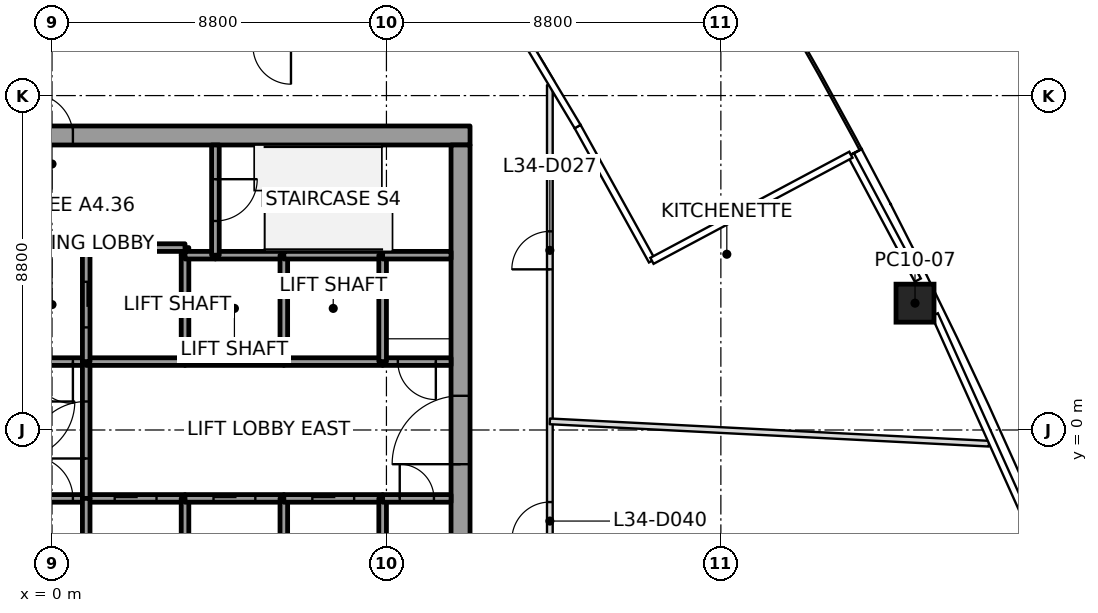
"""IFC4 building model, lengths in metres.
Left out: names, types, materials, properties, quantities, classifications, styles, units other than length and angle.
Written with IfcOpenShell. Run it as: python <this file> out.ifc"""

import sys

from ifc_helpers import new_model, si_unit, direction, frame, frame_2d, origin, origin_2d, place, context, subcontext, project, spatial, rectangle, extrude, element, fill, save


model = new_model("IFC4")
c1 = context("Model", 3, precision=1e-05, world=origin(), true_north=direction((0.0, 1.0)))
c2 = subcontext(c1, "Body", "Model", "MODEL_VIEW")
j1 = project(units=[si_unit("LENGTHUNIT", "METRE"), si_unit("PLANEANGLEUNIT", "RADIAN")], contexts=[c1])
p1 = place(None, origin())
s1 = spatial("IfcSite", under=j1, at=p1, CompositionType="ELEMENT")
p2 = place(p1, origin())
s2 = spatial("IfcBuilding", under=s1, at=p2, CompositionType="ELEMENT")
p3 = place(p2, frame((0.0, 0.0, 157.8)))
s3 = spatial("IfcBuildingStorey", under=s2, at=p3, CompositionType="ELEMENT", Elevation=157.8)
p4 = place(p3, frame((22.709, 3.338, 0.0), z_axis=(-0.014097689605, 0.002074984617, 0.999898469639), x_axis=(-0.440598986635, 0.897667716395, -0.008074894304)))
e1 = element("IfcColumn", 1, at=p4, inside=s3, PredefinedType="COLUMN", context=c2, shape_type="SweptSolid", body=[
    extrude(rectangle(XDim=1.0, YDim=1.0, at=origin_2d()), origin(), (0.0, 0.0, 1.0), 4.0),
])
p5 = place(p3, frame((-11.0, 7.75, 0.0), z_axis=(0.0, 0.0, 1.0), x_axis=(1.0, 0.0, 0.0)))
e2 = element("IfcWall", 2, at=p5, inside=s3, PredefinedType="SHEAR", context=c2, shape_type="SweptSolid", body=[
    extrude(rectangle(XDim=22.0, YDim=0.5, at=frame_2d((11.0, 0.0))), origin(), (0.0, 0.0, 1.0), 4.0),
])
p6 = place(p5, frame((10.45, 0.0, 0.0)))
e3 = element("IfcOpeningElement", 3, at=p6, cuts=e2, PredefinedType="OPENING", context=c2, shape_type="SweptSolid", body=[
    extrude(rectangle(XDim=1.1, YDim=2.1, at=frame_2d((0.55, 1.05))), frame((0.0, 0.25, 0.0), z_axis=(0.0, -1.0, 0.0), x_axis=(1.0, 0.0, 0.0)), (0.0, 0.0, 1.0), 0.5),
])
p7 = place(p3, frame((10.75, -7.5, 0.0), z_axis=(0.0, 0.0, 1.0), x_axis=(0.0, 1.0, 0.0)))
e4 = element("IfcWall", 4, at=p7, inside=s3, PredefinedType="SHEAR", context=c2, shape_type="SweptSolid", body=[
    extrude(rectangle(XDim=15.0, YDim=0.5, at=frame_2d((7.5, 0.0))), origin(), (0.0, 0.0, 1.0), 4.0),
])
p8 = place(p7, frame((6.6, 0.0, 0.0)))
e5 = element("IfcOpeningElement", 5, at=p8, cuts=e4, PredefinedType="OPENING", context=c2, shape_type="SweptSolid", body=[
    extrude(rectangle(XDim=1.8, YDim=2.1, at=frame_2d((0.9, 1.05))), frame((0.0, 0.25, 0.0), z_axis=(0.0, -1.0, 0.0), x_axis=(1.0, 0.0, 0.0)), (0.0, 0.0, 1.0), 0.5),
])
p9 = place(p3, frame((-0.9, -1.8, 0.0), z_axis=(0.0, 0.0, 1.0), x_axis=(1.0, 0.0, 0.0)))
e6 = element("IfcWall", 6, at=p9, inside=s3, PredefinedType="SOLIDWALL", context=c2, shape_type="SweptSolid", body=[
    extrude(rectangle(XDim=1.8, YDim=0.2, at=frame_2d((0.9, 0.0))), origin(), (0.0, 0.0, 1.0), 3.85),
])
p10 = place(p9, frame((0.35, 0.0, 0.0)))
e7 = element("IfcOpeningElement", 7, at=p10, cuts=e6, PredefinedType="OPENING", context=c2, shape_type="SweptSolid", body=[
    extrude(rectangle(XDim=1.1, YDim=2.1, at=frame_2d((0.55, 1.05))), frame((0.0, 0.1, 0.0), z_axis=(0.0, -1.0, 0.0), x_axis=(1.0, 0.0, 0.0)), (0.0, 0.0, 1.0), 0.2),
])
p11 = place(p3, frame((0.9, 1.8, 0.0), z_axis=(0.0, 0.0, 1.0), x_axis=(-1.0, 0.0, 0.0)))
e8 = element("IfcWall", 8, at=p11, inside=s3, PredefinedType="SOLIDWALL", context=c2, shape_type="SweptSolid", body=[
    extrude(rectangle(XDim=1.8, YDim=0.2, at=frame_2d((0.9, 0.0))), origin(), (0.0, 0.0, 1.0), 3.85),
])
p12 = place(p11, frame((0.35, 0.0, 0.0)))
e9 = element("IfcOpeningElement", 9, at=p12, cuts=e8, PredefinedType="OPENING", context=c2, shape_type="SweptSolid", body=[
    extrude(rectangle(XDim=1.1, YDim=2.1, at=frame_2d((0.55, 1.05))), frame((0.0, 0.1, 0.0), z_axis=(0.0, -1.0, 0.0), x_axis=(1.0, 0.0, 0.0)), (0.0, 0.0, 1.0), 0.2),
])
p13 = place(p3, frame((0.9, -1.8, 0.0), z_axis=(0.0, 0.0, 1.0), x_axis=(1.0, 0.0, 0.0)))
e10 = element("IfcWall", 10, at=p13, inside=s3, PredefinedType="SOLIDWALL", context=c2, shape_type="SweptSolid", body=[
    extrude(rectangle(XDim=2.6, YDim=0.2, at=frame_2d((1.3, 0.0))), origin(), (0.0, 0.0, 1.0), 3.85),
])
p14 = place(p13, frame((0.75, 0.0, 0.0)))
e11 = element("IfcOpeningElement", 11, at=p14, cuts=e10, PredefinedType="OPENING", context=c2, shape_type="SweptSolid", body=[
    extrude(rectangle(XDim=1.1, YDim=2.1, at=frame_2d((0.55, 1.05))), frame((0.0, 0.1, 0.0), z_axis=(0.0, -1.0, 0.0), x_axis=(1.0, 0.0, 0.0)), (0.0, 0.0, 1.0), 0.2),
])
p15 = place(p3, frame((0.9, -1.8, 0.0), z_axis=(0.0, 0.0, 1.0), x_axis=(0.0, 1.0, 0.0)))
e12 = element("IfcWall", 12, at=p15, inside=s3, PredefinedType="SOLIDWALL", context=c2, shape_type="SweptSolid", body=[
    extrude(rectangle(XDim=3.6, YDim=0.2, at=frame_2d((1.8, 0.0))), origin(), (0.0, 0.0, 1.0), 3.85),
])
p16 = place(p15, frame((1.05, 0.0, 0.0)))
e13 = element("IfcOpeningElement", 13, at=p16, cuts=e12, PredefinedType="OPENING", context=c2, shape_type="SweptSolid", body=[
    extrude(rectangle(XDim=1.5, YDim=2.1, at=frame_2d((0.75, 1.05))), frame((0.0, 0.1, 0.0), z_axis=(0.0, -1.0, 0.0), x_axis=(1.0, 0.0, 0.0)), (0.0, 0.0, 1.0), 0.2),
])
p17 = place(p3, frame((0.9, -1.8, 0.0), z_axis=(0.0, 0.0, 1.0), x_axis=(0.0, -1.0, 0.0)))
e14 = element("IfcWall", 14, at=p17, inside=s3, PredefinedType="SOLIDWALL", context=c2, shape_type="SweptSolid", body=[
    extrude(rectangle(XDim=2.8, YDim=0.2, at=frame_2d((1.4, 0.0))), origin(), (0.0, 0.0, 1.0), 3.85),
])
p18 = place(p3, frame((3.5, 1.8, 0.0), z_axis=(0.0, 0.0, 1.0), x_axis=(-1.0, 0.0, 0.0)))
e15 = element("IfcWall", 15, at=p18, inside=s3, PredefinedType="SOLIDWALL", context=c2, shape_type="SweptSolid", body=[
    extrude(rectangle(XDim=2.6, YDim=0.2, at=frame_2d((1.3, 0.0))), origin(), (0.0, 0.0, 1.0), 3.85),
])
p19 = place(p3, frame((3.5, 4.6, 0.0), z_axis=(0.0, 0.0, 1.0), x_axis=(0.0, 1.0, 0.0)))
e16 = element("IfcWall", 16, at=p19, inside=s3, PredefinedType="SOLIDWALL", context=c2, shape_type="SweptSolid", body=[
    extrude(rectangle(XDim=0.2, YDim=0.2, at=frame_2d((0.1, 0.0))), origin(), (0.0, 0.0, 1.0), 3.85),
])
p20 = place(p3, frame((3.5, 4.8, 0.0), z_axis=(0.0, 0.0, 1.0), x_axis=(-1.0, 0.0, 0.0)))
e17 = element("IfcWall", 17, at=p20, inside=s3, PredefinedType="SOLIDWALL", context=c2, shape_type="SweptSolid", body=[
    extrude(rectangle(XDim=2.6, YDim=0.2, at=frame_2d((1.3, 0.0))), origin(), (0.0, 0.0, 1.0), 3.85),
])
p21 = place(p3, frame((0.9, 4.8, 0.0), z_axis=(0.0, 0.0, 1.0), x_axis=(0.0, -1.0, 0.0)))
e18 = element("IfcWall", 18, at=p21, inside=s3, PredefinedType="SOLIDWALL", context=c2, shape_type="SweptSolid", body=[
    extrude(rectangle(XDim=3.0, YDim=0.2, at=frame_2d((1.5, 0.0))), origin(), (0.0, 0.0, 1.0), 3.85),
])
p22 = place(p21, frame((0.9, 0.0, 0.0)))
e19 = element("IfcOpeningElement", 19, at=p22, cuts=e18, PredefinedType="OPENING", context=c2, shape_type="SweptSolid", body=[
    extrude(rectangle(XDim=1.2, YDim=2.1, at=frame_2d((0.6, 1.05))), frame((0.0, 0.1, 0.0), z_axis=(0.0, -1.0, 0.0), x_axis=(1.0, 0.0, 0.0)), (0.0, 0.0, 1.0), 0.2),
])
p23 = place(p3, frame((3.5, -4.6, 0.0), z_axis=(0.0, 0.0, 1.0), x_axis=(0.0, 1.0, 0.0)))
e20 = element("IfcWall", 20, at=p23, inside=s3, PredefinedType="SOLIDWALL", context=c2, shape_type="SweptSolid", body=[
    extrude(rectangle(XDim=2.8, YDim=0.2, at=frame_2d((1.4, 0.0))), origin(), (0.0, 0.0, 1.0), 3.85),
])
p24 = place(p3, frame((3.5, -1.8, 0.0), z_axis=(0.0, 0.0, 1.0), x_axis=(1.0, 0.0, 0.0)))
e21 = element("IfcWall", 21, at=p24, inside=s3, PredefinedType="SOLIDWALL", context=c2, shape_type="SweptSolid", body=[
    extrude(rectangle(XDim=2.6, YDim=0.2, at=frame_2d((1.3, 0.0))), origin(), (0.0, 0.0, 1.0), 3.85),
])
p25 = place(p24, frame((0.75, 0.0, 0.0)))
e22 = element("IfcOpeningElement", 22, at=p25, cuts=e21, PredefinedType="OPENING", context=c2, shape_type="SweptSolid", body=[
    extrude(rectangle(XDim=1.1, YDim=2.1, at=frame_2d((0.55, 1.05))), frame((0.0, 0.1, 0.0), z_axis=(0.0, -1.0, 0.0), x_axis=(1.0, 0.0, 0.0)), (0.0, 0.0, 1.0), 0.2),
])
p26 = place(p3, frame((6.1, 1.8, 0.0), z_axis=(0.0, 0.0, 1.0), x_axis=(-1.0, 0.0, 0.0)))
e23 = element("IfcWall", 23, at=p26, inside=s3, PredefinedType="SOLIDWALL", context=c2, shape_type="SweptSolid", body=[
    extrude(rectangle(XDim=2.6, YDim=0.2, at=frame_2d((1.3, 0.0))), origin(), (0.0, 0.0, 1.0), 3.85),
])
p27 = place(p3, frame((3.5, 1.8, 0.0), z_axis=(0.0, 0.0, 1.0), x_axis=(0.0, 1.0, 0.0)))
e24 = element("IfcWall", 24, at=p27, inside=s3, PredefinedType="SOLIDWALL", context=c2, shape_type="SweptSolid", body=[
    extrude(rectangle(XDim=2.8, YDim=0.2, at=frame_2d((1.4, 0.0))), origin(), (0.0, 0.0, 1.0), 3.85),
])
p28 = place(p3, frame((4.3, 4.6, 0.0), z_axis=(0.0, 0.0, 1.0), x_axis=(-1.0, 0.0, 0.0)))
e25 = element("IfcWall", 25, at=p28, inside=s3, PredefinedType="SOLIDWALL", context=c2, shape_type="SweptSolid", body=[
    extrude(rectangle(XDim=0.8, YDim=0.2, at=frame_2d((0.4, 0.0))), origin(), (0.0, 0.0, 1.0), 3.85),
])
p29 = place(p3, frame((6.1, 4.6, 0.0), z_axis=(0.0, 0.0, 1.0), x_axis=(-1.0, 0.0, 0.0)))
e26 = element("IfcWall", 26, at=p29, inside=s3, PredefinedType="SOLIDWALL", context=c2, shape_type="SweptSolid", body=[
    extrude(rectangle(XDim=1.8, YDim=0.2, at=frame_2d((0.9, 0.0))), origin(), (0.0, 0.0, 1.0), 3.85),
])
p30 = place(p3, frame((4.3, 7.5, 0.0), z_axis=(0.0, 0.0, 1.0), x_axis=(0.0, -1.0, 0.0)))
e27 = element("IfcWall", 27, at=p30, inside=s3, PredefinedType="SOLIDWALL", context=c2, shape_type="SweptSolid", body=[
    extrude(rectangle(XDim=2.9, YDim=0.2, at=frame_2d((1.45, 0.0))), origin(), (0.0, 0.0, 1.0), 3.85),
])
p31 = place(p30, frame((0.9, 0.0, 0.0)))
e28 = element("IfcOpeningElement", 28, at=p31, cuts=e27, PredefinedType="OPENING", context=c2, shape_type="SweptSolid", body=[
    extrude(rectangle(XDim=1.1, YDim=2.1, at=frame_2d((0.55, 1.05))), frame((0.0, 0.1, 0.0), z_axis=(0.0, -1.0, 0.0), x_axis=(1.0, 0.0, 0.0)), (0.0, 0.0, 1.0), 0.2),
])
p32 = place(p3, frame((6.1, -4.6, 0.0), z_axis=(0.0, 0.0, 1.0), x_axis=(0.0, 1.0, 0.0)))
e29 = element("IfcWall", 29, at=p32, inside=s3, PredefinedType="SOLIDWALL", context=c2, shape_type="SweptSolid", body=[
    extrude(rectangle(XDim=2.8, YDim=0.2, at=frame_2d((1.4, 0.0))), origin(), (0.0, 0.0, 1.0), 3.85),
])
p33 = place(p3, frame((6.1, -1.8, 0.0), z_axis=(0.0, 0.0, 1.0), x_axis=(1.0, 0.0, 0.0)))
e30 = element("IfcWall", 30, at=p33, inside=s3, PredefinedType="SOLIDWALL", context=c2, shape_type="SweptSolid", body=[
    extrude(rectangle(XDim=2.6, YDim=0.2, at=frame_2d((1.3, 0.0))), origin(), (0.0, 0.0, 1.0), 3.85),
])
p34 = place(p33, frame((0.75, 0.0, 0.0)))
e31 = element("IfcOpeningElement", 31, at=p34, cuts=e30, PredefinedType="OPENING", context=c2, shape_type="SweptSolid", body=[
    extrude(rectangle(XDim=1.1, YDim=2.1, at=frame_2d((0.55, 1.05))), frame((0.0, 0.1, 0.0), z_axis=(0.0, -1.0, 0.0), x_axis=(1.0, 0.0, 0.0)), (0.0, 0.0, 1.0), 0.2),
])
p35 = place(p3, frame((8.7, 1.8, 0.0), z_axis=(0.0, 0.0, 1.0), x_axis=(-1.0, 0.0, 0.0)))
e32 = element("IfcWall", 32, at=p35, inside=s3, PredefinedType="SOLIDWALL", context=c2, shape_type="SweptSolid", body=[
    extrude(rectangle(XDim=2.6, YDim=0.2, at=frame_2d((1.3, 0.0))), origin(), (0.0, 0.0, 1.0), 3.85),
])
p36 = place(p3, frame((6.1, 1.8, 0.0), z_axis=(0.0, 0.0, 1.0), x_axis=(0.0, 1.0, 0.0)))
e33 = element("IfcWall", 33, at=p36, inside=s3, PredefinedType="SOLIDWALL", context=c2, shape_type="SweptSolid", body=[
    extrude(rectangle(XDim=2.8, YDim=0.2, at=frame_2d((1.4, 0.0))), origin(), (0.0, 0.0, 1.0), 3.85),
])
p37 = place(p3, frame((8.7, 4.6, 0.0), z_axis=(0.0, 0.0, 1.0), x_axis=(-1.0, 0.0, 0.0)))
e34 = element("IfcWall", 34, at=p37, inside=s3, PredefinedType="SOLIDWALL", context=c2, shape_type="SweptSolid", body=[
    extrude(rectangle(XDim=2.6, YDim=0.2, at=frame_2d((1.3, 0.0))), origin(), (0.0, 0.0, 1.0), 3.85),
])
p38 = place(p3, frame((8.7, -1.8, 0.0), z_axis=(0.0, 0.0, 1.0), x_axis=(0.0, -1.0, 0.0)))
e35 = element("IfcWall", 35, at=p38, inside=s3, PredefinedType="SOLIDWALL", context=c2, shape_type="SweptSolid", body=[
    extrude(rectangle(XDim=2.8, YDim=0.2, at=frame_2d((1.4, 0.0))), origin(), (0.0, 0.0, 1.0), 3.85),
])
p39 = place(p3, frame((8.7, -1.8, 0.0), z_axis=(0.0, 0.0, 1.0), x_axis=(1.0, 0.0, 0.0)))
e36 = element("IfcWall", 36, at=p39, inside=s3, PredefinedType="SOLIDWALL", context=c2, shape_type="SweptSolid", body=[
    extrude(rectangle(XDim=1.8, YDim=0.2, at=frame_2d((0.9, 0.0))), origin(), (0.0, 0.0, 1.0), 3.85),
])
p40 = place(p39, frame((0.45, 0.0, 0.0)))
e37 = element("IfcOpeningElement", 37, at=p40, cuts=e36, PredefinedType="OPENING", context=c2, shape_type="SweptSolid", body=[
    extrude(rectangle(XDim=0.9, YDim=2.1, at=frame_2d((0.45, 1.05))), frame((0.0, 0.1, 0.0), z_axis=(0.0, -1.0, 0.0), x_axis=(1.0, 0.0, 0.0)), (0.0, 0.0, 1.0), 0.2),
])
p41 = place(p3, frame((10.5, 1.8, 0.0), z_axis=(0.0, 0.0, 1.0), x_axis=(-1.0, 0.0, 0.0)))
e38 = element("IfcWall", 38, at=p41, inside=s3, PredefinedType="SOLIDWALL", context=c2, shape_type="SweptSolid", body=[
    extrude(rectangle(XDim=1.8, YDim=0.2, at=frame_2d((0.9, 0.0))), origin(), (0.0, 0.0, 1.0), 3.85),
])
p42 = place(p41, frame((0.4, 0.0, 0.0)))
e39 = element("IfcOpeningElement", 39, at=p42, cuts=e38, PredefinedType="OPENING", context=c2, shape_type="SweptSolid", body=[
    extrude(rectangle(XDim=1.0, YDim=2.1, at=frame_2d((0.5, 1.05))), frame((0.0, 0.1, 0.0), z_axis=(0.0, -1.0, 0.0), x_axis=(1.0, 0.0, 0.0)), (0.0, 0.0, 1.0), 0.2),
])
p43 = place(p3, frame((8.7, 4.6, 0.0), z_axis=(0.0, 0.0, 1.0), x_axis=(0.0, -1.0, 0.0)))
e40 = element("IfcWall", 40, at=p43, inside=s3, PredefinedType="SOLIDWALL", context=c2, shape_type="SweptSolid", body=[
    extrude(rectangle(XDim=2.8, YDim=0.2, at=frame_2d((1.4, 0.0))), origin(), (0.0, 0.0, 1.0), 3.85),
])
p44 = place(p3, frame((10.5, 4.6, 0.0), z_axis=(0.0, 0.0, 1.0), x_axis=(-1.0, 0.0, 0.0)))
e41 = element("IfcWall", 41, at=p44, inside=s3, PredefinedType="SOLIDWALL", context=c2, shape_type="SweptSolid", body=[
    extrude(rectangle(XDim=1.8, YDim=0.2, at=frame_2d((0.9, 0.0))), origin(), (0.0, 0.0, 1.0), 3.85),
])
p45 = place(p3, frame((24.656, -0.36, 0.0), z_axis=(0.0, 0.0, 1.0), x_axis=(-0.998709406586, 0.050788986957, 0.0)))
e42 = element("IfcWall", 42, at=p45, inside=s3, PredefinedType="PARTITIONING", context=c2, shape_type="SweptSolid", body=[
    extrude(rectangle(XDim=11.57, YDim=0.15, at=frame_2d((5.785, 0.0))), origin(), (0.0, 0.0, 1.0), 3.234),
])
p46 = place(p3, frame((12.884, 9.594, 0.0), z_axis=(0.0, 0.0, 1.0), x_axis=(-0.520280350627, 0.853995525019, 0.0)))
e43 = element("IfcWall", 43, at=p46, inside=s3, PredefinedType="PARTITIONING", context=c2, shape_type="SweptSolid", body=[
    extrude(rectangle(XDim=0.65, YDim=0.15, at=frame_2d((0.325, 0.0))), origin(), (0.0, 0.0, 1.0), 3.45),
])
p47 = place(p3, frame((13.1, -10.02, 0.0), z_axis=(0.0, 0.0, 1.0), x_axis=(0.0, 1.0, 0.0)))
e44 = element("IfcWall", 44, at=p47, inside=s3, PredefinedType="PARTITIONING", context=c2, shape_type="SweptSolid", body=[
    extrude(rectangle(XDim=19.094, YDim=0.15, at=frame_2d((9.547, 0.0))), origin(), (0.0, 0.0, 1.0), 3.166),
])
p48 = place(p47, frame((14.247, 0.0, 0.0)))
e45 = element("IfcOpeningElement", 45, at=p48, cuts=e44, PredefinedType="OPENING", context=c2, shape_type="SweptSolid", body=[
    extrude(rectangle(XDim=1.0, YDim=2.1, at=frame_2d((0.5, 1.05))), frame((0.0, 0.075, 0.0), z_axis=(0.0, -1.0, 0.0), x_axis=(1.0, 0.0, 0.0)), (0.0, 0.0, 1.0), 0.15),
])
p49 = place(p47, frame((1.95, 0.0, 0.0)))
e46 = element("IfcOpeningElement", 46, at=p49, cuts=e44, PredefinedType="OPENING", context=c2, shape_type="SweptSolid", body=[
    extrude(rectangle(XDim=0.9, YDim=2.1, at=frame_2d((0.45, 1.05))), frame((0.0, 0.075, 0.0), z_axis=(0.0, -1.0, 0.0), x_axis=(1.0, 0.0, 0.0)), (0.0, 0.0, 1.0), 0.15),
])
p50 = place(p47, frame((7.124, 0.0, 0.0)))
e47 = element("IfcOpeningElement", 47, at=p50, cuts=e44, PredefinedType="OPENING", context=c2, shape_type="SweptSolid", body=[
    extrude(rectangle(XDim=1.0, YDim=2.1, at=frame_2d((0.5, 1.05))), frame((0.0, 0.075, 0.0), z_axis=(0.0, -1.0, 0.0), x_axis=(1.0, 0.0, 0.0)), (0.0, 0.0, 1.0), 0.15),
])
p51 = place(p3, frame((13.15, 9.142, 0.0), z_axis=(0.0, 0.0, 1.0), x_axis=(-0.506531743392, 0.8622213132, 0.0)))
e48 = element("IfcWall", 48, at=p51, inside=s3, PredefinedType="PARTITIONING", context=c2, shape_type="SweptSolid", body=[
    extrude(rectangle(XDim=0.524, YDim=0.15, at=frame_2d((0.262, 0.0))), origin(), (0.0, 0.0, 1.0), 3.45),
])
p52 = place(p48, origin())
e49 = element("IfcDoor", 49, at=p52, inside=s3, OperationType="SINGLE_SWING_LEFT", PredefinedType="DOOR", context=c2, shape_type="SweptSolid", body=[
    extrude(rectangle(XDim=1.0, YDim=2.1, at=frame_2d((0.5, 1.05))), frame((0.0, 0.025, 0.0), z_axis=(0.0, -1.0, 0.0), x_axis=(1.0, 0.0, 0.0)), (0.0, 0.0, 1.0), 0.05),
])
fill(e45, e49)
p53 = place(p50, origin())
e50 = element("IfcDoor", 50, at=p53, inside=s3, OperationType="SINGLE_SWING_RIGHT", PredefinedType="DOOR", context=c2, shape_type="SweptSolid", body=[
    extrude(rectangle(XDim=1.0, YDim=2.1, at=frame_2d((0.5, 1.05))), frame((0.0, 0.025, 0.0), z_axis=(0.0, -1.0, 0.0), x_axis=(1.0, 0.0, 0.0)), (0.0, 0.0, 1.0), 0.05),
])
fill(e47, e50)
p54 = place(p14, origin())
e51 = element("IfcDoor", 51, at=p54, inside=s3, OperationType="SLIDING_TO_RIGHT", PredefinedType="DOOR", context=c2, shape_type="SweptSolid", body=[
    extrude(rectangle(XDim=1.1, YDim=2.1, at=frame_2d((0.55, 1.05))), frame((0.0, 0.025, 0.0), z_axis=(0.0, -1.0, 0.0), x_axis=(1.0, 0.0, 0.0)), (0.0, 0.0, 1.0), 0.05),
])
fill(e11, e51)
p55 = place(p25, origin())
e52 = element("IfcDoor", 52, at=p55, inside=s3, OperationType="SLIDING_TO_LEFT", PredefinedType="DOOR", context=c2, shape_type="SweptSolid", body=[
    extrude(rectangle(XDim=1.1, YDim=2.1, at=frame_2d((0.55, 1.05))), frame((0.0, 0.025, 0.0), z_axis=(0.0, -1.0, 0.0), x_axis=(1.0, 0.0, 0.0)), (0.0, 0.0, 1.0), 0.05),
])
fill(e22, e52)
p56 = place(p34, origin())
e53 = element("IfcDoor", 53, at=p56, inside=s3, OperationType="SLIDING_TO_LEFT", PredefinedType="DOOR", context=c2, shape_type="SweptSolid", body=[
    extrude(rectangle(XDim=1.1, YDim=2.1, at=frame_2d((0.55, 1.05))), frame((0.0, 0.025, 0.0), z_axis=(0.0, -1.0, 0.0), x_axis=(1.0, 0.0, 0.0)), (0.0, 0.0, 1.0), 0.05),
])
fill(e31, e53)
p57 = place(p22, origin())
e54 = element("IfcDoor", 54, at=p57, inside=s3, OperationType="SLIDING_TO_RIGHT", PredefinedType="DOOR", context=c2, shape_type="SweptSolid", body=[
    extrude(rectangle(XDim=1.2, YDim=2.1, at=frame_2d((0.6, 1.05))), frame((0.0, 0.025, 0.0), z_axis=(0.0, -1.0, 0.0), x_axis=(1.0, 0.0, 0.0)), (0.0, 0.0, 1.0), 0.05),
])
fill(e19, e54)
p58 = place(p16, origin())
e55 = element("IfcDoor", 55, at=p58, inside=s3, OperationType="DOUBLE_DOOR_SINGLE_SWING", PredefinedType="DOOR", context=c2, shape_type="SweptSolid", body=[
    extrude(rectangle(XDim=1.5, YDim=2.1, at=frame_2d((0.75, 1.05))), frame((0.0, 0.025, 0.0), z_axis=(0.0, -1.0, 0.0), x_axis=(1.0, 0.0, 0.0)), (0.0, 0.0, 1.0), 0.05),
])
fill(e13, e55)
p59 = place(p12, origin())
e56 = element("IfcDoor", 56, at=p59, inside=s3, OperationType="SINGLE_SWING_RIGHT", PredefinedType="DOOR", context=c2, shape_type="SweptSolid", body=[
    extrude(rectangle(XDim=1.1, YDim=2.1, at=frame_2d((0.55, 1.05))), frame((0.0, 0.025, 0.0), z_axis=(0.0, -1.0, 0.0), x_axis=(1.0, 0.0, 0.0)), (0.0, 0.0, 1.0), 0.05),
])
fill(e9, e56)
p60 = place(p10, origin())
e57 = element("IfcDoor", 57, at=p60, inside=s3, OperationType="SINGLE_SWING_RIGHT", PredefinedType="DOOR", context=c2, shape_type="SweptSolid", body=[
    extrude(rectangle(XDim=1.1, YDim=2.1, at=frame_2d((0.55, 1.05))), frame((0.0, 0.025, 0.0), z_axis=(0.0, -1.0, 0.0), x_axis=(1.0, 0.0, 0.0)), (0.0, 0.0, 1.0), 0.05),
])
fill(e7, e57)
p61 = place(p42, origin())
e58 = element("IfcDoor", 58, at=p61, inside=s3, OperationType="SINGLE_SWING_LEFT", PredefinedType="DOOR", context=c2, shape_type="SweptSolid", body=[
    extrude(rectangle(XDim=1.0, YDim=2.1, at=frame_2d((0.5, 1.05))), frame((0.0, 0.025, 0.0), z_axis=(0.0, -1.0, 0.0), x_axis=(1.0, 0.0, 0.0)), (0.0, 0.0, 1.0), 0.05),
])
fill(e39, e58)
p62 = place(p31, origin())
e59 = element("IfcDoor", 59, at=p62, inside=s3, OperationType="SINGLE_SWING_RIGHT", PredefinedType="DOOR", context=c2, shape_type="SweptSolid", body=[
    extrude(rectangle(XDim=1.1, YDim=2.1, at=frame_2d((0.55, 1.05))), frame((0.0, 0.025, 0.0), z_axis=(0.0, -1.0, 0.0), x_axis=(1.0, 0.0, 0.0)), (0.0, 0.0, 1.0), 0.05),
])
fill(e28, e59)
p63 = place(p40, origin())
e60 = element("IfcDoor", 60, at=p63, inside=s3, OperationType="SINGLE_SWING_RIGHT", PredefinedType="DOOR", context=c2, shape_type="SweptSolid", body=[
    extrude(rectangle(XDim=0.9, YDim=2.1, at=frame_2d((0.45, 1.05))), frame((0.0, 0.025, 0.0), z_axis=(0.0, -1.0, 0.0), x_axis=(1.0, 0.0, 0.0)), (0.0, 0.0, 1.0), 0.05),
])
fill(e37, e60)
p64 = place(p8, origin())
e61 = element("IfcDoor", 61, at=p64, inside=s3, OperationType="DOUBLE_DOOR_SINGLE_SWING", PredefinedType="DOOR", context=c2, shape_type="SweptSolid", body=[
    extrude(rectangle(XDim=1.8, YDim=2.1, at=frame_2d((0.9, 1.05))), frame((0.0, 0.025, 0.0), z_axis=(0.0, -1.0, 0.0), x_axis=(1.0, 0.0, 0.0)), (0.0, 0.0, 1.0), 0.05),
])
fill(e5, e61)
p65 = place(p6, origin())
e62 = element("IfcDoor", 62, at=p65, inside=s3, OperationType="SINGLE_SWING_LEFT", PredefinedType="DOOR", context=c2, shape_type="SweptSolid", body=[
    extrude(rectangle(XDim=1.1, YDim=2.1, at=frame_2d((0.55, 1.05))), frame((0.0, 0.025, 0.0), z_axis=(0.0, -1.0, 0.0), x_axis=(1.0, 0.0, 0.0)), (0.0, 0.0, 1.0), 0.05),
])
fill(e3, e62)
save(model, sys.argv[1])
